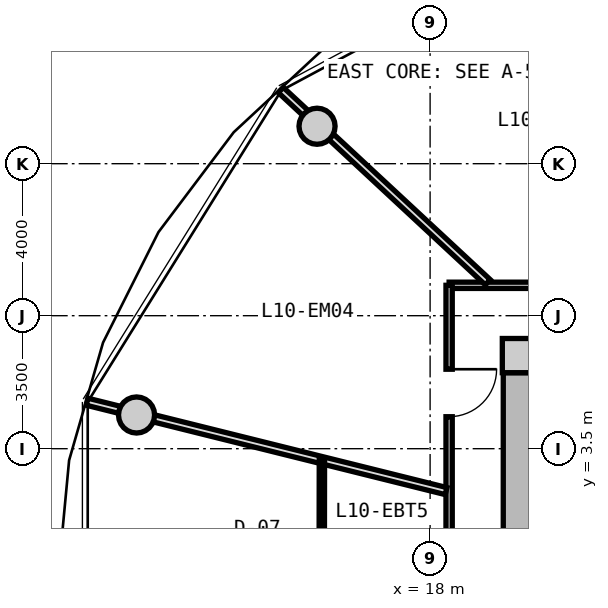
"""IFC4 building model, lengths in metres.
Left out: names, types, materials, properties, quantities, classifications, styles, units other than length and angle.
Written with IfcOpenShell. Run it as: python <this file> out.ifc"""

import sys

from ifc_helpers import new_model, si_unit, direction, frame, frame_2d, origin, origin_2d, place, context, subcontext, project, spatial, rectangle, circle, extrude, source, transform, mapped, element, fill, save


model = new_model("IFC4")
c1 = context("Model", 3, precision=1e-05, world=origin(), true_north=direction((0.0, 1.0)))
c2 = subcontext(c1, "Body", "Model", "MODEL_VIEW")
j1 = project(units=[si_unit("LENGTHUNIT", "METRE"), si_unit("PLANEANGLEUNIT", "RADIAN")], contexts=[c1])
p1 = place(None, origin())
s1 = spatial("IfcSite", under=j1, at=p1, CompositionType="ELEMENT")
p2 = place(p1, origin())
s2 = spatial("IfcBuilding", under=s1, at=p2, CompositionType="ELEMENT")
p3 = place(p2, frame((0.0, 0.0, 36.85)))
s3 = spatial("IfcBuildingStorey", under=s2, at=p3, CompositionType="ELEMENT", Elevation=36.85)
m1 = source(origin(), c2, "Body", "SweptSolid", [
    extrude(rectangle(XDim=0.9, YDim=0.9, at=origin_2d()), origin(), (0.0, 0.0, 1.0), 3.05),
])
p4 = place(p3, frame((20.35, 5.95, 0.0), z_axis=(0.0, 0.0, 1.0), x_axis=(1.0, 0.0, 0.0)))
e1 = element("IfcColumn", 1, at=p4, inside=s3, PredefinedType="COLUMN", context=c2, shape_type="MappedRepresentation", body=[
    mapped(m1, transform((0.0, 0.0, 0.0), x_axis=(1.0, 0.0, 0.0), y_axis=(0.0, 1.0, 0.0), z_axis=(0.0, 0.0, 1.0), scale=1.0)),
])
m2 = source(origin(), c2, "Body", "SweptSolid", [
    extrude(rectangle(XDim=11.0, YDim=0.85, at=frame_2d((5.5, 0.0))), origin(), (0.0, 0.0, 1.0), 2.79),
])
p5 = place(p3, frame((20.35, -5.5, 0.0), z_axis=(0.0, 0.0, 1.0), x_axis=(0.0, 1.0, 0.0)))
e2 = element("IfcWall", 2, at=p5, inside=s3, PredefinedType="SHEAR", context=c2, shape_type="MappedRepresentation", body=[
    mapped(m2, transform((0.0, 0.0, 0.0), x_axis=(1.0, 0.0, 0.0), y_axis=(0.0, 1.0, 0.0), z_axis=(0.0, 0.0, 1.0), scale=1.0)),
])
p6 = place(p5, frame((3.8, 0.0, 0.0)))
e3 = element("IfcOpeningElement", 3, at=p6, cuts=e2, PredefinedType="OPENING", context=c2, shape_type="SweptSolid", body=[
    extrude(rectangle(XDim=1.2, YDim=2.15, at=frame_2d((0.6, 1.075))), frame((0.0, 0.435, 0.0), z_axis=(0.0, -1.0, 0.0), x_axis=(1.0, 0.0, 0.0)), (0.0, 0.0, 1.0), 0.87),
])
m3 = source(origin(), c2, "Body", "SweptSolid", [
    extrude(circle(Radius=0.475, at=origin_2d()), origin(), (0.0, 0.0, 1.0), 3.05),
])
for number, where, z_axis, x_axis in (
    (4, (15.025, 11.985, 0.0), (0.0, 0.0, 1.0), (1.0, 0.0, 0.0)),
    (5, (10.275, 4.387, 0.0), (0.0, 0.0, 1.0), (1.0, 0.0, 0.0)),
):
    element("IfcColumn", number, at=place(p3, frame(where, z_axis=z_axis, x_axis=x_axis)), inside=s3, PredefinedType="COLUMN", context=c2, shape_type="MappedRepresentation", body=[
        mapped(m3, transform((0.0, 0.0, 0.0), x_axis=(1.0, 0.0, 0.0), y_axis=(0.0, 1.0, 0.0), z_axis=(0.0, 0.0, 1.0), scale=1.0)),
    ])
m4 = source(origin(), c2, "Body", "SweptSolid", [
    extrude(rectangle(XDim=19.0, YDim=0.165, at=frame_2d((9.5, 0.0))), origin(), (0.0, 0.0, 1.0), 2.775),
])
p7 = place(p3, frame((18.5, 7.8, 0.0), z_axis=(0.0, 0.0, 1.0), x_axis=(1.0, 0.0, 0.0)))
e6 = element("IfcWall", 6, at=p7, inside=s3, PredefinedType="PARTITIONING", context=c2, shape_type="MappedRepresentation", body=[
    mapped(m4, transform((0.0, 0.0, 0.0), x_axis=(1.0, 0.0, 0.0), y_axis=(0.0, 1.0, 0.0), z_axis=(0.0, 0.0, 1.0), scale=1.0)),
])
p8 = place(p7, frame((10.523, 0.0, 0.0)))
e7 = element("IfcOpeningElement", 7, at=p8, cuts=e6, PredefinedType="OPENING", context=c2, shape_type="SweptSolid", body=[
    extrude(rectangle(XDim=0.92, YDim=2.1, at=frame_2d((0.46, 1.05))), frame((0.0, 0.093, 0.0), z_axis=(0.0, -1.0, 0.0), x_axis=(1.0, 0.0, 0.0)), (0.0, 0.0, 1.0), 0.185),
])
p9 = place(p7, frame((8.226, 0.0, 0.0)))
e8 = element("IfcOpeningElement", 8, at=p9, cuts=e6, PredefinedType="OPENING", context=c2, shape_type="SweptSolid", body=[
    extrude(rectangle(XDim=0.92, YDim=2.1, at=frame_2d((0.46, 1.05))), frame((0.0, 0.093, 0.0), z_axis=(0.0, -1.0, 0.0), x_axis=(1.0, 0.0, 0.0)), (0.0, 0.0, 1.0), 0.185),
])
p10 = place(p7, frame((3.506, 0.0, 0.0)))
e9 = element("IfcOpeningElement", 9, at=p10, cuts=e6, PredefinedType="OPENING", context=c2, shape_type="SweptSolid", body=[
    extrude(rectangle(XDim=1.25, YDim=2.2, at=frame_2d((0.625, 1.1))), frame((0.0, 0.093, 0.0), z_axis=(0.0, -1.0, 0.0), x_axis=(1.0, 0.0, 0.0)), (0.0, 0.0, 1.0), 0.185),
])
p11 = place(p7, frame((12.706, 0.0, 0.0)))
e10 = element("IfcOpeningElement", 10, at=p11, cuts=e6, PredefinedType="OPENING", context=c2, shape_type="SweptSolid", body=[
    extrude(rectangle(XDim=1.05, YDim=2.15, at=frame_2d((0.525, 1.075))), frame((0.0, 0.093, 0.0), z_axis=(0.0, -1.0, 0.0), x_axis=(1.0, 0.0, 0.0)), (0.0, 0.0, 1.0), 0.185),
])
m5 = source(origin(), c2, "Body", "SweptSolid", [
    extrude(rectangle(XDim=15.6, YDim=0.165, at=frame_2d((7.8, 0.0))), origin(), (0.0, 0.0, 1.0), 2.775),
])
p12 = place(p3, frame((18.5, -7.8, 0.0), z_axis=(0.0, 0.0, 1.0), x_axis=(0.0, 1.0, 0.0)))
e11 = element("IfcWall", 11, at=p12, inside=s3, PredefinedType="PARTITIONING", context=c2, shape_type="MappedRepresentation", body=[
    mapped(m5, transform((0.0, 0.0, 0.0), x_axis=(1.0, 0.0, 0.0), y_axis=(0.0, 1.0, 0.0), z_axis=(0.0, 0.0, 1.0), scale=1.0)),
])
p13 = place(p12, frame((12.141, 0.0, 0.0)))
e12 = element("IfcOpeningElement", 12, at=p13, cuts=e11, PredefinedType="OPENING", context=c2, shape_type="SweptSolid", body=[
    extrude(rectangle(XDim=1.25, YDim=2.2, at=frame_2d((0.625, 1.1))), frame((0.0, 0.093, 0.0), z_axis=(0.0, -1.0, 0.0), x_axis=(1.0, 0.0, 0.0)), (0.0, 0.0, 1.0), 0.185),
])
p14 = place(p12, frame((3.63, 0.0, 0.0)))
e13 = element("IfcOpeningElement", 13, at=p14, cuts=e11, PredefinedType="OPENING", context=c2, shape_type="SweptSolid", body=[
    extrude(rectangle(XDim=1.05, YDim=2.15, at=frame_2d((0.525, 1.075))), frame((0.0, 0.093, 0.0), z_axis=(0.0, -1.0, 0.0), x_axis=(1.0, 0.0, 0.0)), (0.0, 0.0, 1.0), 0.185),
])
m6 = source(origin(), c2, "Body", "SweptSolid", [
    extrude(rectangle(XDim=7.435, YDim=0.19, at=frame_2d((3.717, 0.0))), origin(), (0.0, 0.0, 1.0), 2.225),
])
p15 = place(p3, frame((19.517, 7.88, 0.0), z_axis=(0.0, 0.0, 1.0), x_axis=(-0.732651956848, 0.680603489652, 0.0)))
e14 = element("IfcWall", 14, at=p15, inside=s3, PredefinedType="PARTITIONING", context=c2, shape_type="MappedRepresentation", body=[
    mapped(m6, transform((0.0, 0.0, 0.0), x_axis=(1.0, 0.0, 0.0), y_axis=(0.0, 1.0, 0.0), z_axis=(0.0, 0.0, 1.0), scale=1.0)),
])
m7 = source(origin(), c2, "Body", "SweptSolid", [
    extrude(rectangle(XDim=9.737, YDim=0.19, at=frame_2d((4.869, 0.0))), origin(), (0.0, 0.0, 1.0), 2.225),
])
p16 = place(p3, frame((18.42, 2.385, 0.0), z_axis=(0.0, 0.0, 1.0), x_axis=(-0.970392716238, 0.241532557375, 0.0)))
e15 = element("IfcWall", 15, at=p16, inside=s3, PredefinedType="PARTITIONING", context=c2, shape_type="MappedRepresentation", body=[
    mapped(m7, transform((0.0, 0.0, 0.0), x_axis=(1.0, 0.0, 0.0), y_axis=(0.0, 1.0, 0.0), z_axis=(0.0, 0.0, 1.0), scale=1.0)),
])
m8 = source(origin(), c2, "Body", "SweptSolid", [
    extrude(rectangle(XDim=2.795, YDim=0.14, at=frame_2d((1.397, 0.0))), origin(), (0.0, 0.0, 1.0), 2.775),
])
p17 = place(p3, frame((15.148, 0.419, 0.0), z_axis=(0.0, 0.0, 1.0), x_axis=(0.001659531299, 0.999998622977, 0.0)))
e16 = element("IfcWall", 16, at=p17, inside=s3, PredefinedType="PARTITIONING", context=c2, shape_type="MappedRepresentation", body=[
    mapped(m8, transform((0.0, 0.0, 0.0), x_axis=(1.0, 0.0, 0.0), y_axis=(0.0, 1.0, 0.0), z_axis=(0.0, 0.0, 1.0), scale=1.0)),
])
m9 = source(origin(), c2, "Body", "SweptSolid", [
    extrude(rectangle(XDim=1.25, YDim=2.2, at=frame_2d((0.625, 1.1))), frame((0.0, 0.025, 0.0), z_axis=(0.0, -1.0, 0.0), x_axis=(1.0, 0.0, 0.0)), (0.0, 0.0, 1.0), 0.05),
])
p18 = place(p13, frame((1.25, 0.0, 0.0), z_axis=(0.0, 0.0, 1.0), x_axis=(-1.0, 0.0, 0.0)))
e17 = element("IfcDoor", 17, at=p18, inside=s3, OperationType="SINGLE_SWING_LEFT", PredefinedType="DOOR", context=c2, shape_type="MappedRepresentation", body=[
    mapped(m9, transform((0.0, 0.0, 0.0), x_axis=(1.0, 0.0, 0.0), y_axis=(0.0, 1.0, 0.0), z_axis=(0.0, 0.0, 1.0), scale=1.0)),
])
fill(e12, e17)
save(model, sys.argv[1])
